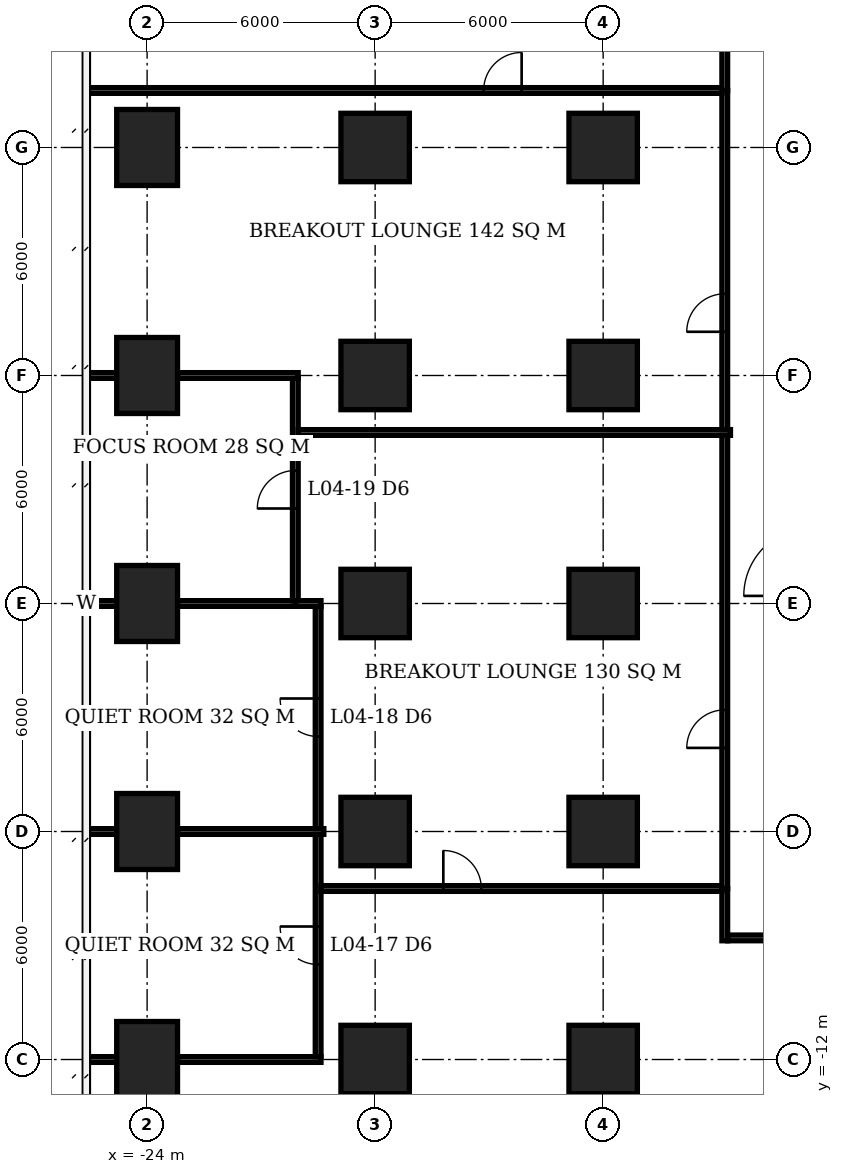
"""IFC4 building model, lengths in metres.
Left out: names, types, materials, properties, quantities, classifications, styles, units other than length and angle.
Written with IfcOpenShell. Run it as: python <this file> out.ifc"""

import sys

from ifc_helpers import new_model, si_unit, direction, frame, frame_2d, origin, origin_2d, place, context, subcontext, project, spatial, rectangle, extrude, element, fill, save


model = new_model("IFC4")
c1 = context("Model", 3, precision=1e-05, world=origin(), true_north=direction((0.0, 1.0)))
c2 = subcontext(c1, "Body", "Model", "MODEL_VIEW")
j1 = project(units=[si_unit("LENGTHUNIT", "METRE"), si_unit("PLANEANGLEUNIT", "RADIAN")], contexts=[c1])
p1 = place(None, origin())
s1 = spatial("IfcSite", under=j1, at=p1, CompositionType="ELEMENT")
p2 = place(p1, origin())
s2 = spatial("IfcBuilding", under=s1, at=p2, CompositionType="ELEMENT")
p3 = place(p2, frame((0.0, 0.0, 22.1)))
s3 = spatial("IfcBuildingStorey", under=s2, at=p3, CompositionType="ELEMENT", Elevation=22.1)
for number, where, z_axis, x_axis in (
    (1, (-24.0, -12.0, 0.0), (0.0, 0.0, 1.0), (0.0, 1.0, 0.0)),
    (2, (-24.0, -6.0, 0.0), (0.0, 0.0, 1.0), (0.0, 1.0, 0.0)),
    (3, (-24.0, 0.0, 0.0), (0.0, 0.0, 1.0), (0.0, 1.0, 0.0)),
    (4, (-24.0, 6.0, 0.0), (0.0, 0.0, 1.0), (0.0, 1.0, 0.0)),
    (5, (-24.0, 12.0, 0.0), (0.0, 0.0, 1.0), (0.0, 1.0, 0.0)),
):
    element("IfcColumn", number, at=place(p3, frame(where, z_axis=z_axis, x_axis=x_axis)), inside=s3, PredefinedType="COLUMN", context=c2, shape_type="SweptSolid", body=[
        extrude(rectangle(XDim=2.0, YDim=1.6, at=origin_2d()), origin(), (0.0, 0.0, 1.0), 3.9),
    ])
for number, where, z_axis, x_axis in (
    (6, (-18.0, -12.0, 0.0), (0.0, 0.0, 1.0), (1.0, 0.0, 0.0)),
    (7, (-18.0, -6.0, 0.0), (0.0, 0.0, 1.0), (1.0, 0.0, 0.0)),
    (8, (-18.0, 0.0, 0.0), (0.0, 0.0, 1.0), (1.0, 0.0, 0.0)),
    (9, (-18.0, 6.0, 0.0), (0.0, 0.0, 1.0), (1.0, 0.0, 0.0)),
    (10, (-18.0, 12.0, 0.0), (0.0, 0.0, 1.0), (1.0, 0.0, 0.0)),
    (11, (-12.0, -12.0, 0.0), (0.0, 0.0, 1.0), (1.0, 0.0, 0.0)),
    (12, (-12.0, -6.0, 0.0), (0.0, 0.0, 1.0), (1.0, 0.0, 0.0)),
    (13, (-12.0, 0.0, 0.0), (0.0, 0.0, 1.0), (1.0, 0.0, 0.0)),
    (14, (-12.0, 6.0, 0.0), (0.0, 0.0, 1.0), (1.0, 0.0, 0.0)),
    (15, (-12.0, 12.0, 0.0), (0.0, 0.0, 1.0), (1.0, 0.0, 0.0)),
):
    element("IfcColumn", number, at=place(p3, frame(where, z_axis=z_axis, x_axis=x_axis)), inside=s3, PredefinedType="COLUMN", context=c2, shape_type="SweptSolid", body=[
        extrude(rectangle(XDim=1.8, YDim=1.8, at=origin_2d()), origin(), (0.0, 0.0, 1.0), 3.9),
    ])
p4 = place(p3, frame((-25.6, -12.0, 0.0), z_axis=(0.0, 0.0, 1.0), x_axis=(1.0, 0.0, 0.0)))
e16 = element("IfcWall", 16, at=p4, inside=s3, PredefinedType="PARTITIONING", context=c2, shape_type="SweptSolid", body=[
    extrude(rectangle(XDim=0.8, YDim=0.15, at=frame_2d((0.4, 0.0))), origin(), (0.0, 0.0, 1.0), 3.65),
])
p5 = place(p3, frame((-23.2, -12.0, 0.0), z_axis=(0.0, 0.0, 1.0), x_axis=(1.0, 0.0, 0.0)))
e17 = element("IfcWall", 17, at=p5, inside=s3, PredefinedType="PARTITIONING", context=c2, shape_type="SweptSolid", body=[
    extrude(rectangle(XDim=3.775, YDim=0.15, at=frame_2d((1.887, 0.0))), origin(), (0.0, 0.0, 1.0), 3.65),
])
p6 = place(p3, frame((-25.6, -6.0, 0.0), z_axis=(0.0, 0.0, 1.0), x_axis=(1.0, 0.0, 0.0)))
e18 = element("IfcWall", 18, at=p6, inside=s3, PredefinedType="PARTITIONING", context=c2, shape_type="SweptSolid", body=[
    extrude(rectangle(XDim=0.8, YDim=0.15, at=frame_2d((0.4, 0.0))), origin(), (0.0, 0.0, 1.0), 3.65),
])
p7 = place(p3, frame((-23.2, -6.0, 0.0), z_axis=(0.0, 0.0, 1.0), x_axis=(1.0, 0.0, 0.0)))
e19 = element("IfcWall", 19, at=p7, inside=s3, PredefinedType="PARTITIONING", context=c2, shape_type="SweptSolid", body=[
    extrude(rectangle(XDim=3.85, YDim=0.15, at=frame_2d((1.925, 0.0))), origin(), (0.0, 0.0, 1.0), 3.65),
])
p8 = place(p3, frame((-25.55, 0.0, 0.0), z_axis=(0.0, 0.0, 1.0), x_axis=(1.0, 0.0, 0.0)))
e20 = element("IfcWall", 20, at=p8, inside=s3, PredefinedType="PARTITIONING", context=c2, shape_type="SweptSolid", body=[
    extrude(rectangle(XDim=0.75, YDim=0.15, at=frame_2d((0.375, 0.0))), origin(), (0.0, 0.0, 1.0), 3.65),
])
p9 = place(p3, frame((-23.2, 0.0, 0.0), z_axis=(0.0, 0.0, 1.0), x_axis=(1.0, 0.0, 0.0)))
e21 = element("IfcWall", 21, at=p9, inside=s3, PredefinedType="PARTITIONING", context=c2, shape_type="SweptSolid", body=[
    extrude(rectangle(XDim=3.175, YDim=0.15, at=frame_2d((1.587, 0.0))), origin(), (0.0, 0.0, 1.0), 3.65),
])
p10 = place(p3, frame((-20.1, 0.0, 0.0), z_axis=(0.0, 0.0, 1.0), x_axis=(1.0, 0.0, 0.0)))
e22 = element("IfcWall", 22, at=p10, inside=s3, PredefinedType="PARTITIONING", context=c2, shape_type="SweptSolid", body=[
    extrude(rectangle(XDim=0.675, YDim=0.15, at=frame_2d((0.337, 0.0))), origin(), (0.0, 0.0, 1.0), 3.65),
])
p11 = place(p3, frame((-25.6, 6.0, 0.0), z_axis=(0.0, 0.0, 1.0), x_axis=(1.0, 0.0, 0.0)))
e23 = element("IfcWall", 23, at=p11, inside=s3, PredefinedType="PARTITIONING", context=c2, shape_type="SweptSolid", body=[
    extrude(rectangle(XDim=0.8, YDim=0.15, at=frame_2d((0.4, 0.0))), origin(), (0.0, 0.0, 1.0), 3.65),
])
p12 = place(p3, frame((-23.2, 6.0, 0.0), z_axis=(0.0, 0.0, 1.0), x_axis=(1.0, 0.0, 0.0)))
e24 = element("IfcWall", 24, at=p12, inside=s3, PredefinedType="PARTITIONING", context=c2, shape_type="SweptSolid", body=[
    extrude(rectangle(XDim=3.175, YDim=0.15, at=frame_2d((1.587, 0.0))), origin(), (0.0, 0.0, 1.0), 3.65),
])
p13 = place(p3, frame((-20.1, 0.075, 0.0), z_axis=(0.0, 0.0, 1.0), x_axis=(0.0, 1.0, 0.0)))
e25 = element("IfcWall", 25, at=p13, inside=s3, PredefinedType="PARTITIONING", context=c2, shape_type="SweptSolid", body=[
    extrude(rectangle(XDim=5.85, YDim=0.15, at=frame_2d((2.925, 0.0))), origin(), (0.0, 0.0, 1.0), 3.65),
])
p14 = place(p13, frame((2.425, 0.0, 0.0)))
e26 = element("IfcOpeningElement", 26, at=p14, cuts=e25, PredefinedType="OPENING", context=c2, shape_type="SweptSolid", body=[
    extrude(rectangle(XDim=1.0, YDim=2.1, at=frame_2d((0.5, 1.05))), frame((0.0, 0.085, 0.0), z_axis=(0.0, -1.0, 0.0), x_axis=(1.0, 0.0, 0.0)), (0.0, 0.0, 1.0), 0.17),
])
p15 = place(p3, frame((-19.5, -11.925, 0.0), z_axis=(0.0, 0.0, 1.0), x_axis=(0.0, 1.0, 0.0)))
e27 = element("IfcWall", 27, at=p15, inside=s3, PredefinedType="PARTITIONING", context=c2, shape_type="SweptSolid", body=[
    extrude(rectangle(XDim=5.85, YDim=0.15, at=frame_2d((2.925, 0.0))), origin(), (0.0, 0.0, 1.0), 3.65),
])
p16 = place(p15, frame((2.425, 0.0, 0.0)))
e28 = element("IfcOpeningElement", 28, at=p16, cuts=e27, PredefinedType="OPENING", context=c2, shape_type="SweptSolid", body=[
    extrude(rectangle(XDim=1.0, YDim=2.1, at=frame_2d((0.5, 1.05))), frame((0.0, 0.085, 0.0), z_axis=(0.0, -1.0, 0.0), x_axis=(1.0, 0.0, 0.0)), (0.0, 0.0, 1.0), 0.17),
])
p17 = place(p3, frame((-19.5, -5.925, 0.0), z_axis=(0.0, 0.0, 1.0), x_axis=(0.0, 1.0, 0.0)))
e29 = element("IfcWall", 29, at=p17, inside=s3, PredefinedType="PARTITIONING", context=c2, shape_type="SweptSolid", body=[
    extrude(rectangle(XDim=5.85, YDim=0.15, at=frame_2d((2.925, 0.0))), origin(), (0.0, 0.0, 1.0), 3.65),
])
p18 = place(p17, frame((2.425, 0.0, 0.0)))
e30 = element("IfcOpeningElement", 30, at=p18, cuts=e29, PredefinedType="OPENING", context=c2, shape_type="SweptSolid", body=[
    extrude(rectangle(XDim=1.0, YDim=2.1, at=frame_2d((0.5, 1.05))), frame((0.0, 0.085, 0.0), z_axis=(0.0, -1.0, 0.0), x_axis=(1.0, 0.0, 0.0)), (0.0, 0.0, 1.0), 0.17),
])
p19 = place(p3, frame((-25.6, 13.5, 0.0), z_axis=(0.0, 0.0, 1.0), x_axis=(1.0, 0.0, 0.0)))
e31 = element("IfcWall", 31, at=p19, inside=s3, PredefinedType="PARTITIONING", context=c2, shape_type="SweptSolid", body=[
    extrude(rectangle(XDim=16.725, YDim=0.15, at=frame_2d((8.363, 0.0))), origin(), (0.0, 0.0, 1.0), 3.65),
])
p20 = place(p19, frame((10.455, 0.0, 0.0)))
e32 = element("IfcOpeningElement", 32, at=p20, cuts=e31, PredefinedType="OPENING", context=c2, shape_type="SweptSolid", body=[
    extrude(rectangle(XDim=1.0, YDim=2.1, at=frame_2d((0.5, 1.05))), frame((0.0, 0.085, 0.0), z_axis=(0.0, -1.0, 0.0), x_axis=(1.0, 0.0, 0.0)), (0.0, 0.0, 1.0), 0.17),
])
p21 = place(p3, frame((-20.025, 4.5, 0.0), z_axis=(0.0, 0.0, 1.0), x_axis=(1.0, 0.0, 0.0)))
e33 = element("IfcWall", 33, at=p21, inside=s3, PredefinedType="PARTITIONING", context=c2, shape_type="SweptSolid", body=[
    extrude(rectangle(XDim=11.375, YDim=0.15, at=frame_2d((5.688, 0.0))), origin(), (0.0, 0.0, 1.0), 3.65),
])
p22 = place(p3, frame((-19.425, -7.5, 0.0), z_axis=(0.0, 0.0, 1.0), x_axis=(1.0, 0.0, 0.0)))
e34 = element("IfcWall", 34, at=p22, inside=s3, PredefinedType="PARTITIONING", context=c2, shape_type="SweptSolid", body=[
    extrude(rectangle(XDim=10.55, YDim=0.15, at=frame_2d((5.275, 0.0))), origin(), (0.0, 0.0, 1.0), 3.65),
])
p23 = place(p22, frame((3.219, 0.0, 0.0)))
e35 = element("IfcOpeningElement", 35, at=p23, cuts=e34, PredefinedType="OPENING", context=c2, shape_type="SweptSolid", body=[
    extrude(rectangle(XDim=1.0, YDim=2.1, at=frame_2d((0.5, 1.05))), frame((0.0, 0.085, 0.0), z_axis=(0.0, -1.0, 0.0), x_axis=(1.0, 0.0, 0.0)), (0.0, 0.0, 1.0), 0.17),
])
p24 = place(p3, frame((-8.8, -8.875, 0.0), z_axis=(0.0, 0.0, 1.0), x_axis=(0.0, 1.0, 0.0)))
e36 = element("IfcWall", 36, at=p24, inside=s3, PredefinedType="PARTITIONING", context=c2, shape_type="SweptSolid", body=[
    extrude(rectangle(XDim=1.375, YDim=0.15, at=frame_2d((0.688, 0.0))), origin(), (0.0, 0.0, 1.0), 3.65),
])
p25 = place(p3, frame((-8.725, -8.8, 0.0), z_axis=(0.0, 0.0, 1.0), x_axis=(1.0, 0.0, 0.0)))
e37 = element("IfcWall", 37, at=p25, inside=s3, PredefinedType="PARTITIONING", context=c2, shape_type="SweptSolid", body=[
    extrude(rectangle(XDim=1.325, YDim=0.15, at=frame_2d((0.663, 0.0))), origin(), (0.0, 0.0, 1.0), 3.65),
])
p26 = place(p3, frame((-8.8, -7.5, 0.0), z_axis=(0.0, 0.0, 1.0), x_axis=(0.0, 1.0, 0.0)))
e38 = element("IfcWall", 38, at=p26, inside=s3, PredefinedType="PARTITIONING", context=c2, shape_type="SweptSolid", body=[
    extrude(rectangle(XDim=11.925, YDim=0.15, at=frame_2d((5.962, 0.0))), origin(), (0.0, 0.0, 1.0), 3.65),
])
p27 = place(p26, frame((3.7, 0.0, 0.0)))
e39 = element("IfcOpeningElement", 39, at=p27, cuts=e38, PredefinedType="OPENING", context=c2, shape_type="SweptSolid", body=[
    extrude(rectangle(XDim=1.0, YDim=2.1, at=frame_2d((0.5, 1.05))), frame((0.0, 0.085, 0.0), z_axis=(0.0, -1.0, 0.0), x_axis=(1.0, 0.0, 0.0)), (0.0, 0.0, 1.0), 0.17),
])
p28 = place(p3, frame((-8.8, 4.575, 0.0), z_axis=(0.0, 0.0, 1.0), x_axis=(0.0, 1.0, 0.0)))
e40 = element("IfcWall", 40, at=p28, inside=s3, PredefinedType="PARTITIONING", context=c2, shape_type="SweptSolid", body=[
    extrude(rectangle(XDim=8.925, YDim=0.15, at=frame_2d((4.462, 0.0))), origin(), (0.0, 0.0, 1.0), 3.65),
])
p29 = place(p28, frame((2.575, 0.0, 0.0)))
e41 = element("IfcOpeningElement", 41, at=p29, cuts=e40, PredefinedType="OPENING", context=c2, shape_type="SweptSolid", body=[
    extrude(rectangle(XDim=1.0, YDim=2.1, at=frame_2d((0.5, 1.05))), frame((0.0, 0.085, 0.0), z_axis=(0.0, -1.0, 0.0), x_axis=(1.0, 0.0, 0.0)), (0.0, 0.0, 1.0), 0.17),
])
p30 = place(p3, frame((-8.8, 13.5, 0.0), z_axis=(0.0, 0.0, 1.0), x_axis=(0.0, 1.0, 0.0)))
e42 = element("IfcWall", 42, at=p30, inside=s3, PredefinedType="PARTITIONING", context=c2, shape_type="SweptSolid", body=[
    extrude(rectangle(XDim=1.375, YDim=0.15, at=frame_2d((0.688, 0.0))), origin(), (0.0, 0.0, 1.0), 3.65),
])
p31 = place(p16, origin())
e43 = element("IfcDoor", 43, at=p31, inside=s3, OperationType="SINGLE_SWING_RIGHT", PredefinedType="DOOR", context=c2, shape_type="SweptSolid", body=[
    extrude(rectangle(XDim=1.0, YDim=2.1, at=frame_2d((0.5, 1.05))), frame((0.0, 0.025, 0.0), z_axis=(0.0, -1.0, 0.0), x_axis=(1.0, 0.0, 0.0)), (0.0, 0.0, 1.0), 0.05),
])
fill(e28, e43)
p32 = place(p18, origin())
e44 = element("IfcDoor", 44, at=p32, inside=s3, OperationType="SINGLE_SWING_RIGHT", PredefinedType="DOOR", context=c2, shape_type="SweptSolid", body=[
    extrude(rectangle(XDim=1.0, YDim=2.1, at=frame_2d((0.5, 1.05))), frame((0.0, 0.025, 0.0), z_axis=(0.0, -1.0, 0.0), x_axis=(1.0, 0.0, 0.0)), (0.0, 0.0, 1.0), 0.05),
])
fill(e30, e44)
p33 = place(p14, origin())
e45 = element("IfcDoor", 45, at=p33, inside=s3, OperationType="SINGLE_SWING_LEFT", PredefinedType="DOOR", context=c2, shape_type="SweptSolid", body=[
    extrude(rectangle(XDim=1.0, YDim=2.1, at=frame_2d((0.5, 1.05))), frame((0.0, 0.025, 0.0), z_axis=(0.0, -1.0, 0.0), x_axis=(1.0, 0.0, 0.0)), (0.0, 0.0, 1.0), 0.05),
])
fill(e26, e45)
p34 = place(p23, origin())
e46 = element("IfcDoor", 46, at=p34, inside=s3, OperationType="SINGLE_SWING_LEFT", PredefinedType="DOOR", context=c2, shape_type="SweptSolid", body=[
    extrude(rectangle(XDim=1.0, YDim=2.1, at=frame_2d((0.5, 1.05))), frame((0.0, 0.025, 0.0), z_axis=(0.0, -1.0, 0.0), x_axis=(1.0, 0.0, 0.0)), (0.0, 0.0, 1.0), 0.05),
])
fill(e35, e46)
p35 = place(p27, origin())
e47 = element("IfcDoor", 47, at=p35, inside=s3, OperationType="SINGLE_SWING_LEFT", PredefinedType="DOOR", context=c2, shape_type="SweptSolid", body=[
    extrude(rectangle(XDim=1.0, YDim=2.1, at=frame_2d((0.5, 1.05))), frame((0.0, 0.025, 0.0), z_axis=(0.0, -1.0, 0.0), x_axis=(1.0, 0.0, 0.0)), (0.0, 0.0, 1.0), 0.05),
])
fill(e39, e47)
p36 = place(p29, origin())
e48 = element("IfcDoor", 48, at=p36, inside=s3, OperationType="SINGLE_SWING_LEFT", PredefinedType="DOOR", context=c2, shape_type="SweptSolid", body=[
    extrude(rectangle(XDim=1.0, YDim=2.1, at=frame_2d((0.5, 1.05))), frame((0.0, 0.025, 0.0), z_axis=(0.0, -1.0, 0.0), x_axis=(1.0, 0.0, 0.0)), (0.0, 0.0, 1.0), 0.05),
])
fill(e41, e48)
p37 = place(p20, origin())
e49 = element("IfcDoor", 49, at=p37, inside=s3, OperationType="SINGLE_SWING_RIGHT", PredefinedType="DOOR", context=c2, shape_type="SweptSolid", body=[
    extrude(rectangle(XDim=1.0, YDim=2.1, at=frame_2d((0.5, 1.05))), frame((0.0, 0.025, 0.0), z_axis=(0.0, -1.0, 0.0), x_axis=(1.0, 0.0, 0.0)), (0.0, 0.0, 1.0), 0.05),
])
fill(e32, e49)
save(model, sys.argv[1])
